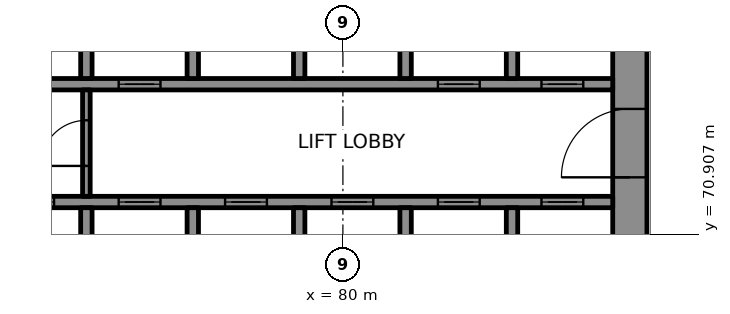
"""IFC4 building model, lengths in metres.
Left out: names, types, materials, properties, quantities, classifications, styles, units other than length and angle.
Written with IfcOpenShell. Run it as: python <this file> out.ifc"""

import sys

from ifc_helpers import new_model, si_unit, direction, frame, frame_2d, origin, place, context, subcontext, project, spatial, rectangle, extrude, element, fill, save


model = new_model("IFC4")
c1 = context("Model", 3, precision=1e-05, world=origin(), true_north=direction((0.0, 1.0)))
c2 = subcontext(c1, "Body", "Model", "MODEL_VIEW")
j1 = project(units=[si_unit("LENGTHUNIT", "METRE"), si_unit("PLANEANGLEUNIT", "RADIAN")], contexts=[c1])
p1 = place(None, origin())
s1 = spatial("IfcSite", under=j1, at=p1, CompositionType="ELEMENT")
p2 = place(p1, origin())
s2 = spatial("IfcBuilding", under=s1, at=p2, CompositionType="ELEMENT")
p3 = place(p2, frame((0.0, 0.0, 82.0)))
s3 = spatial("IfcBuildingStorey", under=s2, at=p3, CompositionType="ELEMENT", Elevation=82.0)
p4 = place(p3, frame((87.55, 66.9, 0.0), z_axis=(0.0, 0.0, 1.0), x_axis=(0.0, 1.0, 0.0)))
e1 = element("IfcWall", 1, at=p4, inside=s3, PredefinedType="SHEAR", context=c2, shape_type="SweptSolid", body=[
    extrude(rectangle(XDim=16.2, YDim=0.9, at=frame_2d((8.1, 0.0))), origin(), (0.0, 0.0, 1.0), 4.0),
])
p5 = place(p4, frame((5.5, 0.0, 0.0)))
e2 = element("IfcOpeningElement", 2, at=p5, cuts=e1, PredefinedType="OPENING", context=c2, shape_type="SweptSolid", body=[
    extrude(rectangle(XDim=1.8, YDim=2.1, at=frame_2d((0.9, 1.05))), frame((0.0, 0.46, 0.0), z_axis=(0.0, -1.0, 0.0), x_axis=(1.0, 0.0, 0.0)), (0.0, 0.0, 1.0), 0.92),
])
p6 = place(p4, frame((11.738, 0.0, 0.0)))
e3 = element("IfcOpeningElement", 3, at=p6, cuts=e1, PredefinedType="OPENING", context=c2, shape_type="SweptSolid", body=[
    extrude(rectangle(XDim=0.9, YDim=2.1, at=frame_2d((0.45, 1.05))), frame((0.0, 0.46, 0.0), z_axis=(0.0, -1.0, 0.0), x_axis=(1.0, 0.0, 0.0)), (0.0, 0.0, 1.0), 0.92),
])
p7 = place(p3, frame((70.3, 71.75, 0.0), z_axis=(0.0, 0.0, 1.0), x_axis=(1.0, 0.0, 0.0)))
e4 = element("IfcWall", 4, at=p7, inside=s3, PredefinedType="SHEAR", context=c2, shape_type="SweptSolid", body=[
    extrude(rectangle(XDim=16.8, YDim=0.3, at=frame_2d((8.4, 0.0))), origin(), (0.0, 0.0, 1.0), 4.0),
])
p8 = place(p7, frame((1.0, 0.0, 0.0)))
e5 = element("IfcOpeningElement", 5, at=p8, cuts=e4, PredefinedType="OPENING", context=c2, shape_type="SweptSolid", body=[
    extrude(rectangle(XDim=1.1, YDim=2.1, at=frame_2d((0.55, 1.05))), frame((0.0, 0.16, 0.0), z_axis=(0.0, -1.0, 0.0), x_axis=(1.0, 0.0, 0.0)), (0.0, 0.0, 1.0), 0.32),
])
p9 = place(p7, frame((3.8, 0.0, 0.0)))
e6 = element("IfcOpeningElement", 6, at=p9, cuts=e4, PredefinedType="OPENING", context=c2, shape_type="SweptSolid", body=[
    extrude(rectangle(XDim=1.1, YDim=2.1, at=frame_2d((0.55, 1.05))), frame((0.0, 0.16, 0.0), z_axis=(0.0, -1.0, 0.0), x_axis=(1.0, 0.0, 0.0)), (0.0, 0.0, 1.0), 0.32),
])
p10 = place(p7, frame((6.6, 0.0, 0.0)))
e7 = element("IfcOpeningElement", 7, at=p10, cuts=e4, PredefinedType="OPENING", context=c2, shape_type="SweptSolid", body=[
    extrude(rectangle(XDim=1.1, YDim=2.1, at=frame_2d((0.55, 1.05))), frame((0.0, 0.16, 0.0), z_axis=(0.0, -1.0, 0.0), x_axis=(1.0, 0.0, 0.0)), (0.0, 0.0, 1.0), 0.32),
])
p11 = place(p7, frame((9.4, 0.0, 0.0)))
e8 = element("IfcOpeningElement", 8, at=p11, cuts=e4, PredefinedType="OPENING", context=c2, shape_type="SweptSolid", body=[
    extrude(rectangle(XDim=1.1, YDim=2.1, at=frame_2d((0.55, 1.05))), frame((0.0, 0.16, 0.0), z_axis=(0.0, -1.0, 0.0), x_axis=(1.0, 0.0, 0.0)), (0.0, 0.0, 1.0), 0.32),
])
p12 = place(p7, frame((12.2, 0.0, 0.0)))
e9 = element("IfcOpeningElement", 9, at=p12, cuts=e4, PredefinedType="OPENING", context=c2, shape_type="SweptSolid", body=[
    extrude(rectangle(XDim=1.1, YDim=2.1, at=frame_2d((0.55, 1.05))), frame((0.0, 0.16, 0.0), z_axis=(0.0, -1.0, 0.0), x_axis=(1.0, 0.0, 0.0)), (0.0, 0.0, 1.0), 0.32),
])
p13 = place(p7, frame((14.925, 0.0, 0.0)))
e10 = element("IfcOpeningElement", 10, at=p13, cuts=e4, PredefinedType="OPENING", context=c2, shape_type="SweptSolid", body=[
    extrude(rectangle(XDim=1.1, YDim=2.1, at=frame_2d((0.55, 1.05))), frame((0.0, 0.16, 0.0), z_axis=(0.0, -1.0, 0.0), x_axis=(1.0, 0.0, 0.0)), (0.0, 0.0, 1.0), 0.32),
])
p14 = place(p3, frame((70.3, 74.85, 0.0), z_axis=(0.0, 0.0, 1.0), x_axis=(1.0, 0.0, 0.0)))
e11 = element("IfcWall", 11, at=p14, inside=s3, PredefinedType="SHEAR", context=c2, shape_type="SweptSolid", body=[
    extrude(rectangle(XDim=16.8, YDim=0.3, at=frame_2d((8.4, 0.0))), origin(), (0.0, 0.0, 1.0), 4.0),
])
p15 = place(p14, frame((3.8, 0.0, 0.0)))
e12 = element("IfcOpeningElement", 12, at=p15, cuts=e11, PredefinedType="OPENING", context=c2, shape_type="SweptSolid", body=[
    extrude(rectangle(XDim=1.1, YDim=2.1, at=frame_2d((0.55, 1.05))), frame((0.0, 0.16, 0.0), z_axis=(0.0, -1.0, 0.0), x_axis=(1.0, 0.0, 0.0)), (0.0, 0.0, 1.0), 0.32),
])
p16 = place(p14, frame((12.2, 0.0, 0.0)))
e13 = element("IfcOpeningElement", 13, at=p16, cuts=e11, PredefinedType="OPENING", context=c2, shape_type="SweptSolid", body=[
    extrude(rectangle(XDim=1.1, YDim=2.1, at=frame_2d((0.55, 1.05))), frame((0.0, 0.16, 0.0), z_axis=(0.0, -1.0, 0.0), x_axis=(1.0, 0.0, 0.0)), (0.0, 0.0, 1.0), 0.32),
])
p17 = place(p14, frame((14.925, 0.0, 0.0)))
e14 = element("IfcOpeningElement", 14, at=p17, cuts=e11, PredefinedType="OPENING", context=c2, shape_type="SweptSolid", body=[
    extrude(rectangle(XDim=1.1, YDim=2.1, at=frame_2d((0.55, 1.05))), frame((0.0, 0.16, 0.0), z_axis=(0.0, -1.0, 0.0), x_axis=(1.0, 0.0, 0.0)), (0.0, 0.0, 1.0), 0.32),
])
for number, where, z_axis, x_axis in (
    (15, (73.25, 69.0, 0.0), (0.0, 0.0, 1.0), (0.0, 1.0, 0.0)),
    (16, (73.25, 75.0, 0.0), (0.0, 0.0, 1.0), (0.0, 1.0, 0.0)),
    (17, (76.05, 69.0, 0.0), (0.0, 0.0, 1.0), (0.0, 1.0, 0.0)),
    (18, (76.05, 75.0, 0.0), (0.0, 0.0, 1.0), (0.0, 1.0, 0.0)),
    (19, (78.85, 69.0, 0.0), (0.0, 0.0, 1.0), (0.0, 1.0, 0.0)),
    (20, (78.85, 75.0, 0.0), (0.0, 0.0, 1.0), (0.0, 1.0, 0.0)),
    (21, (81.65, 69.0, 0.0), (0.0, 0.0, 1.0), (0.0, 1.0, 0.0)),
    (22, (81.65, 75.0, 0.0), (0.0, 0.0, 1.0), (0.0, 1.0, 0.0)),
    (23, (84.45, 69.0, 0.0), (0.0, 0.0, 1.0), (0.0, 1.0, 0.0)),
    (24, (84.45, 75.0, 0.0), (0.0, 0.0, 1.0), (0.0, 1.0, 0.0)),
):
    element("IfcWall", number, at=place(p3, frame(where, z_axis=z_axis, x_axis=x_axis)), inside=s3, PredefinedType="SHEAR", context=c2, shape_type="SweptSolid", body=[
        extrude(rectangle(XDim=2.6, YDim=0.3, at=frame_2d((1.3, 0.0))), origin(), (0.0, 0.0, 1.0), 4.0),
    ])
p18 = place(p3, frame((110.601, 61.239, 0.0), z_axis=(0.0, 0.0, 1.0), x_axis=(-0.499998492585, 0.866026274089, 0.0)))
e25 = element("IfcWall", 25, at=p18, inside=s3, PredefinedType="SOLIDWALL", context=c2, shape_type="SweptSolid", body=[
    extrude(rectangle(XDim=59.436, YDim=0.8, at=frame_2d((29.718, 0.0))), origin(), (0.0, 0.0, 1.0), 0.9),
])
p19 = place(p3, frame((73.25, 71.9, 0.0), z_axis=(0.0, 0.0, 1.0), x_axis=(0.0, 1.0, 0.0)))
e26 = element("IfcWall", 26, at=p19, inside=s3, PredefinedType="PARTITIONING", context=c2, shape_type="SweptSolid", body=[
    extrude(rectangle(XDim=2.8, YDim=0.2, at=frame_2d((1.4, 0.0))), origin(), (0.0, 0.0, 1.0), 4.0),
])
p20 = place(p19, frame((0.8, 0.0, 0.0)))
e27 = element("IfcOpeningElement", 27, at=p20, cuts=e26, PredefinedType="OPENING", context=c2, shape_type="SweptSolid", body=[
    extrude(rectangle(XDim=1.2, YDim=2.1, at=frame_2d((0.6, 1.05))), frame((0.0, 0.11, 0.0), z_axis=(0.0, -1.0, 0.0), x_axis=(1.0, 0.0, 0.0)), (0.0, 0.0, 1.0), 0.22),
])
p21 = place(p8, origin())
e28 = element("IfcDoor", 28, at=p21, inside=s3, OperationType="DOUBLE_DOOR_SLIDING", PredefinedType="DOOR", context=c2, shape_type="SweptSolid", body=[
    extrude(rectangle(XDim=1.1, YDim=2.1, at=frame_2d((0.55, 1.05))), frame((0.0, 0.025, 0.0), z_axis=(0.0, -1.0, 0.0), x_axis=(1.0, 0.0, 0.0)), (0.0, 0.0, 1.0), 0.05),
])
fill(e5, e28)
p22 = place(p9, origin())
e29 = element("IfcDoor", 29, at=p22, inside=s3, OperationType="DOUBLE_DOOR_SLIDING", PredefinedType="DOOR", context=c2, shape_type="SweptSolid", body=[
    extrude(rectangle(XDim=1.1, YDim=2.1, at=frame_2d((0.55, 1.05))), frame((0.0, 0.025, 0.0), z_axis=(0.0, -1.0, 0.0), x_axis=(1.0, 0.0, 0.0)), (0.0, 0.0, 1.0), 0.05),
])
fill(e6, e29)
p23 = place(p10, origin())
e30 = element("IfcDoor", 30, at=p23, inside=s3, OperationType="DOUBLE_DOOR_SLIDING", PredefinedType="DOOR", context=c2, shape_type="SweptSolid", body=[
    extrude(rectangle(XDim=1.1, YDim=2.1, at=frame_2d((0.55, 1.05))), frame((0.0, 0.025, 0.0), z_axis=(0.0, -1.0, 0.0), x_axis=(1.0, 0.0, 0.0)), (0.0, 0.0, 1.0), 0.05),
])
fill(e7, e30)
p24 = place(p11, origin())
e31 = element("IfcDoor", 31, at=p24, inside=s3, OperationType="DOUBLE_DOOR_SLIDING", PredefinedType="DOOR", context=c2, shape_type="SweptSolid", body=[
    extrude(rectangle(XDim=1.1, YDim=2.1, at=frame_2d((0.55, 1.05))), frame((0.0, 0.025, 0.0), z_axis=(0.0, -1.0, 0.0), x_axis=(1.0, 0.0, 0.0)), (0.0, 0.0, 1.0), 0.05),
])
fill(e8, e31)
p25 = place(p12, origin())
e32 = element("IfcDoor", 32, at=p25, inside=s3, OperationType="DOUBLE_DOOR_SLIDING", PredefinedType="DOOR", context=c2, shape_type="SweptSolid", body=[
    extrude(rectangle(XDim=1.1, YDim=2.1, at=frame_2d((0.55, 1.05))), frame((0.0, 0.025, 0.0), z_axis=(0.0, -1.0, 0.0), x_axis=(1.0, 0.0, 0.0)), (0.0, 0.0, 1.0), 0.05),
])
fill(e9, e32)
p26 = place(p13, origin())
e33 = element("IfcDoor", 33, at=p26, inside=s3, OperationType="DOUBLE_DOOR_SLIDING", PredefinedType="DOOR", context=c2, shape_type="SweptSolid", body=[
    extrude(rectangle(XDim=1.1, YDim=2.1, at=frame_2d((0.55, 1.05))), frame((0.0, 0.025, 0.0), z_axis=(0.0, -1.0, 0.0), x_axis=(1.0, 0.0, 0.0)), (0.0, 0.0, 1.0), 0.05),
])
fill(e10, e33)
p27 = place(p15, origin())
e34 = element("IfcDoor", 34, at=p27, inside=s3, OperationType="DOUBLE_DOOR_SLIDING", PredefinedType="DOOR", context=c2, shape_type="SweptSolid", body=[
    extrude(rectangle(XDim=1.1, YDim=2.1, at=frame_2d((0.55, 1.05))), frame((0.0, 0.025, 0.0), z_axis=(0.0, -1.0, 0.0), x_axis=(1.0, 0.0, 0.0)), (0.0, 0.0, 1.0), 0.05),
])
fill(e12, e34)
p28 = place(p16, origin())
e35 = element("IfcDoor", 35, at=p28, inside=s3, OperationType="DOUBLE_DOOR_SLIDING", PredefinedType="DOOR", context=c2, shape_type="SweptSolid", body=[
    extrude(rectangle(XDim=1.1, YDim=2.1, at=frame_2d((0.55, 1.05))), frame((0.0, 0.025, 0.0), z_axis=(0.0, -1.0, 0.0), x_axis=(1.0, 0.0, 0.0)), (0.0, 0.0, 1.0), 0.05),
])
fill(e13, e35)
p29 = place(p17, origin())
e36 = element("IfcDoor", 36, at=p29, inside=s3, OperationType="DOUBLE_DOOR_SLIDING", PredefinedType="DOOR", context=c2, shape_type="SweptSolid", body=[
    extrude(rectangle(XDim=1.1, YDim=2.1, at=frame_2d((0.55, 1.05))), frame((0.0, 0.025, 0.0), z_axis=(0.0, -1.0, 0.0), x_axis=(1.0, 0.0, 0.0)), (0.0, 0.0, 1.0), 0.05),
])
fill(e14, e36)
p30 = place(p20, origin())
e37 = element("IfcDoor", 37, at=p30, inside=s3, OperationType="SINGLE_SWING_LEFT", PredefinedType="DOOR", context=c2, shape_type="SweptSolid", body=[
    extrude(rectangle(XDim=1.2, YDim=2.1, at=frame_2d((0.6, 1.05))), frame((0.0, 0.025, 0.0), z_axis=(0.0, -1.0, 0.0), x_axis=(1.0, 0.0, 0.0)), (0.0, 0.0, 1.0), 0.05),
])
fill(e27, e37)
p31 = place(p5, origin())
e38 = element("IfcDoor", 38, at=p31, inside=s3, OperationType="SINGLE_SWING_RIGHT", PredefinedType="DOOR", context=c2, shape_type="SweptSolid", body=[
    extrude(rectangle(XDim=1.8, YDim=2.1, at=frame_2d((0.9, 1.05))), frame((0.0, 0.17, 0.0), z_axis=(0.0, -1.0, 0.0), x_axis=(1.0, 0.0, 0.0)), (0.0, 0.0, 1.0), 0.34),
])
fill(e2, e38)
save(model, sys.argv[1])
